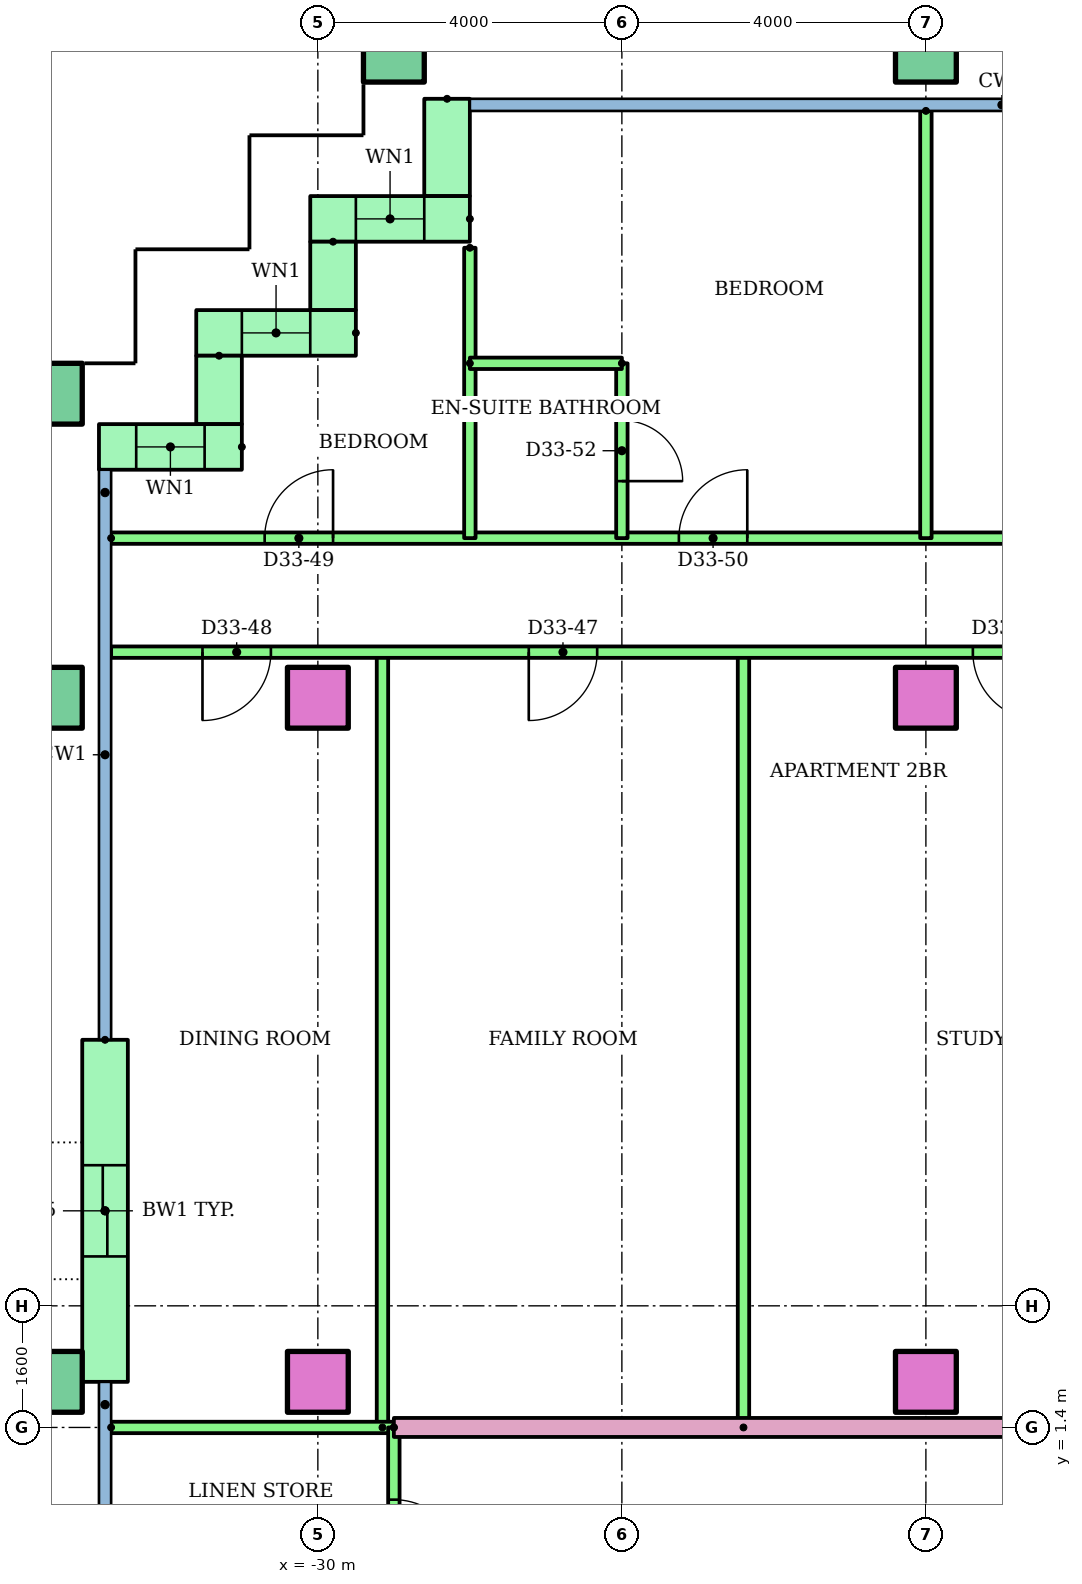
"""IFC4 building model, lengths in metres.
Left out: names, types, materials, properties, quantities, classifications, styles, units other than length and angle.
Written with IfcOpenShell. Run it as: python <this file> out.ifc"""

import sys

from ifc_helpers import new_model, si_unit, direction, frame, frame_2d, origin, origin_2d, place, context, subcontext, project, spatial, rectangle, hollow_rectangle, extrude, element, fill, save


model = new_model("IFC4")
c1 = context("Model", 3, precision=1e-05, world=origin(), true_north=direction((0.0, 1.0)))
c2 = subcontext(c1, "Body", "Model", "MODEL_VIEW")
j1 = project(units=[si_unit("LENGTHUNIT", "METRE"), si_unit("PLANEANGLEUNIT", "RADIAN")], contexts=[c1])
p1 = place(None, origin())
s1 = spatial("IfcSite", under=j1, at=p1, CompositionType="ELEMENT")
p2 = place(p1, origin())
s2 = spatial("IfcBuilding", under=s1, at=p2, CompositionType="ELEMENT")
p3 = place(p2, frame((0.0, 0.0, 129.4)))
s3 = spatial("IfcBuildingStorey", under=s2, at=p3, CompositionType="ELEMENT", Elevation=129.4)
p4 = place(p3, frame((-33.5, 2.0, 0.0)))
e1 = element("IfcColumn", 1, at=p4, inside=s3, PredefinedType="COLUMN", context=c2, shape_type="SweptSolid", body=[
    extrude(hollow_rectangle(XDim=0.8, YDim=0.8, WallThickness=0.04, at=origin_2d()), origin(), (0.0, 0.0, 1.0), 3.2),
])
for number, where in (
    (2, (-30.0, 2.0, 0.0)),
    (3, (-22.0, 2.0, 0.0)),
):
    element("IfcColumn", number, at=place(p3, frame(where)), inside=s3, PredefinedType="COLUMN", context=c2, shape_type="SweptSolid", body=[
        extrude(rectangle(XDim=0.8, YDim=0.8, at=origin_2d()), origin(), (0.0, 0.0, 1.0), 3.2),
    ])
p5 = place(p3, frame((-33.5, 11.0, 0.0)))
e4 = element("IfcColumn", 4, at=p5, inside=s3, PredefinedType="COLUMN", context=c2, shape_type="SweptSolid", body=[
    extrude(hollow_rectangle(XDim=0.8, YDim=0.8, WallThickness=0.04, at=origin_2d()), origin(), (0.0, 0.0, 1.0), 3.2),
])
for number, where in (
    (5, (-30.0, 11.0, 0.0)),
    (6, (-22.0, 11.0, 0.0)),
):
    element("IfcColumn", number, at=place(p3, frame(where)), inside=s3, PredefinedType="COLUMN", context=c2, shape_type="SweptSolid", body=[
        extrude(rectangle(XDim=0.8, YDim=0.8, at=origin_2d()), origin(), (0.0, 0.0, 1.0), 3.2),
    ])
for number, where in (
    (7, (-33.5, 15.0, 0.0)),
    (8, (-29.0, 19.5, 0.0)),
    (9, (-22.0, 19.5, 0.0)),
):
    element("IfcColumn", number, at=place(p3, frame(where)), inside=s3, PredefinedType="COLUMN", context=c2, shape_type="SweptSolid", body=[
        extrude(hollow_rectangle(XDim=0.8, YDim=0.8, WallThickness=0.04, at=origin_2d()), origin(), (0.0, 0.0, 1.0), 3.2),
    ])
p6 = place(p3, frame((-28.3, 18.88, 0.0), z_axis=(0.0, 0.0, 1.0), x_axis=(0.0, -1.0, 0.0)))
e10 = element("IfcWall", 10, at=p6, inside=s3, PredefinedType="STANDARD", context=c2, shape_type="SweptSolid", body=[
    extrude(rectangle(XDim=1.28, YDim=0.6, at=frame_2d((0.64, 0.0))), origin(), (0.0, 0.0, 1.0), 2.92),
])
p7 = place(p3, frame((-28.0, 17.3, 0.0), z_axis=(0.0, 0.0, 1.0), x_axis=(-1.0, 0.0, 0.0)))
e11 = element("IfcWall", 11, at=p7, inside=s3, PredefinedType="STANDARD", context=c2, shape_type="SweptSolid", body=[
    extrude(rectangle(XDim=2.1, YDim=0.6, at=frame_2d((1.05, 0.0))), origin(), (0.0, 0.0, 1.0), 2.92),
])
p8 = place(p7, frame((0.6, 0.0, 0.9)))
e12 = element("IfcOpeningElement", 12, at=p8, cuts=e11, PredefinedType="OPENING", context=c2, shape_type="SweptSolid", body=[
    extrude(rectangle(XDim=0.9, YDim=1.5, at=frame_2d((0.45, 0.75))), frame((0.0, 0.31, 0.0), z_axis=(0.0, -1.0, 0.0), x_axis=(1.0, 0.0, 0.0)), (0.0, 0.0, 1.0), 0.62),
])
p9 = place(p3, frame((-29.8, 17.0, 0.0), z_axis=(0.0, 0.0, 1.0), x_axis=(0.0, -1.0, 0.0)))
e13 = element("IfcWall", 13, at=p9, inside=s3, PredefinedType="STANDARD", context=c2, shape_type="SweptSolid", body=[
    extrude(rectangle(XDim=0.9, YDim=0.6, at=frame_2d((0.45, 0.0))), origin(), (0.0, 0.0, 1.0), 2.92),
])
p10 = place(p3, frame((-29.5, 15.8, 0.0), z_axis=(0.0, 0.0, 1.0), x_axis=(-1.0, 0.0, 0.0)))
e14 = element("IfcWall", 14, at=p10, inside=s3, PredefinedType="STANDARD", context=c2, shape_type="SweptSolid", body=[
    extrude(rectangle(XDim=2.1, YDim=0.6, at=frame_2d((1.05, 0.0))), origin(), (0.0, 0.0, 1.0), 2.92),
])
p11 = place(p10, frame((0.6, 0.0, 0.9)))
e15 = element("IfcOpeningElement", 15, at=p11, cuts=e14, PredefinedType="OPENING", context=c2, shape_type="SweptSolid", body=[
    extrude(rectangle(XDim=0.9, YDim=1.5, at=frame_2d((0.45, 0.75))), frame((0.0, 0.31, 0.0), z_axis=(0.0, -1.0, 0.0), x_axis=(1.0, 0.0, 0.0)), (0.0, 0.0, 1.0), 0.62),
])
p12 = place(p3, frame((-31.3, 15.5, 0.0), z_axis=(0.0, 0.0, 1.0), x_axis=(0.0, -1.0, 0.0)))
e16 = element("IfcWall", 16, at=p12, inside=s3, PredefinedType="STANDARD", context=c2, shape_type="SweptSolid", body=[
    extrude(rectangle(XDim=0.9, YDim=0.6, at=frame_2d((0.45, 0.0))), origin(), (0.0, 0.0, 1.0), 2.92),
])
p13 = place(p3, frame((-31.0, 14.3, 0.0), z_axis=(0.0, 0.0, 1.0), x_axis=(-1.0, 0.0, 0.0)))
e17 = element("IfcWall", 17, at=p13, inside=s3, PredefinedType="STANDARD", context=c2, shape_type="SweptSolid", body=[
    extrude(rectangle(XDim=1.88, YDim=0.6, at=frame_2d((0.94, 0.0))), origin(), (0.0, 0.0, 1.0), 2.92),
])
p14 = place(p13, frame((0.49, 0.0, 0.9)))
e18 = element("IfcOpeningElement", 18, at=p14, cuts=e17, PredefinedType="OPENING", context=c2, shape_type="SweptSolid", body=[
    extrude(rectangle(XDim=0.9, YDim=1.5, at=frame_2d((0.45, 0.75))), frame((0.0, 0.31, 0.0), z_axis=(0.0, -1.0, 0.0), x_axis=(1.0, 0.0, 0.0)), (0.0, 0.0, 1.0), 0.62),
])
p15 = place(p3, frame((-32.8, 6.5, 0.0), z_axis=(0.0, 0.0, 1.0), x_axis=(0.0, -1.0, 0.0)))
e19 = element("IfcWall", 19, at=p15, inside=s3, PredefinedType="STANDARD", context=c2, shape_type="SweptSolid", body=[
    extrude(rectangle(XDim=4.5, YDim=0.6, at=frame_2d((2.25, 0.0))), origin(), (0.0, 0.0, 1.0), 2.92),
])
p16 = place(p15, frame((1.65, 0.0, 0.0)))
e20 = element("IfcOpeningElement", 20, at=p16, cuts=e19, PredefinedType="OPENING", context=c2, shape_type="SweptSolid", body=[
    extrude(rectangle(XDim=1.2, YDim=2.1, at=frame_2d((0.6, 1.05))), frame((0.0, 0.31, 0.0), z_axis=(0.0, -1.0, 0.0), x_axis=(1.0, 0.0, 0.0)), (0.0, 0.0, 1.0), 0.62),
])
for number, where, z_axis, x_axis in (
    (21, (-24.4, 1.4, 0.0), (0.0, 0.0, 1.0), (0.0, 1.0, 0.0)),
    (22, (-29.15, 1.4, 0.0), (0.0, 0.0, 1.0), (0.0, 1.0, 0.0)),
):
    element("IfcWall", number, at=place(p3, frame(where, z_axis=z_axis, x_axis=x_axis)), inside=s3, PredefinedType="PARTITIONING", context=c2, shape_type="SweptSolid", body=[
        extrude(rectangle(XDim=10.2, YDim=0.15, at=frame_2d((5.1, 0.0))), origin(), (0.0, 0.0, 1.0), 2.4),
    ])
p17 = place(p3, frame((-16.0, 11.6, 0.0), z_axis=(0.0, 0.0, 1.0), x_axis=(-1.0, 0.0, 0.0)))
e23 = element("IfcWall", 23, at=p17, inside=s3, PredefinedType="PARTITIONING", context=c2, shape_type="SweptSolid", body=[
    extrude(rectangle(XDim=16.72, YDim=0.15, at=frame_2d((8.36, 0.0))), origin(), (0.0, 0.0, 1.0), 2.4),
])
p18 = place(p17, frame((4.482, 0.0, 0.0)))
e24 = element("IfcOpeningElement", 24, at=p18, cuts=e23, PredefinedType="OPENING", context=c2, shape_type="SweptSolid", body=[
    extrude(rectangle(XDim=0.9, YDim=2.1, at=frame_2d((0.45, 1.05))), frame((0.0, 0.085, 0.0), z_axis=(0.0, -1.0, 0.0), x_axis=(1.0, 0.0, 0.0)), (0.0, 0.0, 1.0), 0.17),
])
p19 = place(p17, frame((10.325, 0.0, 0.0)))
e25 = element("IfcOpeningElement", 25, at=p19, cuts=e23, PredefinedType="OPENING", context=c2, shape_type="SweptSolid", body=[
    extrude(rectangle(XDim=0.9, YDim=2.1, at=frame_2d((0.45, 1.05))), frame((0.0, 0.085, 0.0), z_axis=(0.0, -1.0, 0.0), x_axis=(1.0, 0.0, 0.0)), (0.0, 0.0, 1.0), 0.17),
])
p20 = place(p17, frame((14.618, 0.0, 0.0)))
e26 = element("IfcOpeningElement", 26, at=p20, cuts=e23, PredefinedType="OPENING", context=c2, shape_type="SweptSolid", body=[
    extrude(rectangle(XDim=0.9, YDim=2.1, at=frame_2d((0.45, 1.05))), frame((0.0, 0.085, 0.0), z_axis=(0.0, -1.0, 0.0), x_axis=(1.0, 0.0, 0.0)), (0.0, 0.0, 1.0), 0.17),
])
p21 = place(p3, frame((-32.72, 13.1, 0.0)))
e27 = element("IfcWall", 27, at=p21, inside=s3, PredefinedType="PARTITIONING", context=c2, shape_type="SweptSolid", body=[
    extrude(rectangle(XDim=18.72, YDim=0.15, at=frame_2d((9.36, 0.0))), origin(), (0.0, 0.0, 1.0), 2.4),
])
p22 = place(p21, frame((2.02, 0.0, 0.0)))
e28 = element("IfcOpeningElement", 28, at=p22, cuts=e27, PredefinedType="OPENING", context=c2, shape_type="SweptSolid", body=[
    extrude(rectangle(XDim=0.9, YDim=2.1, at=frame_2d((0.45, 1.05))), frame((0.0, 0.085, 0.0), z_axis=(0.0, -1.0, 0.0), x_axis=(1.0, 0.0, 0.0)), (0.0, 0.0, 1.0), 0.17),
])
p23 = place(p21, frame((7.47, 0.0, 0.0)))
e29 = element("IfcOpeningElement", 29, at=p23, cuts=e27, PredefinedType="OPENING", context=c2, shape_type="SweptSolid", body=[
    extrude(rectangle(XDim=0.9, YDim=2.1, at=frame_2d((0.45, 1.05))), frame((0.0, 0.085, 0.0), z_axis=(0.0, -1.0, 0.0), x_axis=(1.0, 0.0, 0.0)), (0.0, 0.0, 1.0), 0.17),
])
p24 = place(p21, frame((14.22, 0.0, 0.0)))
e30 = element("IfcOpeningElement", 30, at=p24, cuts=e27, PredefinedType="OPENING", context=c2, shape_type="SweptSolid", body=[
    extrude(rectangle(XDim=1.0, YDim=2.1, at=frame_2d((0.5, 1.05))), frame((0.0, 0.085, 0.0), z_axis=(0.0, -1.0, 0.0), x_axis=(1.0, 0.0, 0.0)), (0.0, 0.0, 1.0), 0.17),
])
p25 = place(p3, frame((-28.0, 16.92, 0.0), z_axis=(0.0, 0.0, 1.0), x_axis=(0.0, -1.0, 0.0)))
e31 = element("IfcWall", 31, at=p25, inside=s3, PredefinedType="PARTITIONING", context=c2, shape_type="SweptSolid", body=[
    extrude(rectangle(XDim=3.82, YDim=0.15, at=frame_2d((1.91, 0.0))), origin(), (0.0, 0.0, 1.0), 2.4),
])
p26 = place(p3, frame((-22.0, 18.721, 0.0), z_axis=(0.0, 0.0, 1.0), x_axis=(0.0, -1.0, 0.0)))
e32 = element("IfcWall", 32, at=p26, inside=s3, PredefinedType="PARTITIONING", context=c2, shape_type="SweptSolid", body=[
    extrude(rectangle(XDim=5.621, YDim=0.15, at=frame_2d((2.811, 0.0))), origin(), (0.0, 0.0, 1.0), 2.4),
])
p27 = place(p3, frame((-26.0, 15.4, 0.0), z_axis=(0.0, 0.0, 1.0), x_axis=(0.0, -1.0, 0.0)))
e33 = element("IfcWall", 33, at=p27, inside=s3, PredefinedType="PARTITIONING", context=c2, shape_type="SweptSolid", body=[
    extrude(rectangle(XDim=2.3, YDim=0.15, at=frame_2d((1.15, 0.0))), origin(), (0.0, 0.0, 1.0), 2.4),
])
p28 = place(p27, frame((0.75, 0.0, 0.0)))
e34 = element("IfcOpeningElement", 34, at=p28, cuts=e33, PredefinedType="OPENING", context=c2, shape_type="SweptSolid", body=[
    extrude(rectangle(XDim=0.8, YDim=2.1, at=frame_2d((0.4, 1.05))), frame((0.0, 0.085, 0.0), z_axis=(0.0, -1.0, 0.0), x_axis=(1.0, 0.0, 0.0)), (0.0, 0.0, 1.0), 0.17),
])
p29 = place(p3, frame((-28.0, 15.4, 0.0)))
e35 = element("IfcWall", 35, at=p29, inside=s3, PredefinedType="PARTITIONING", context=c2, shape_type="SweptSolid", body=[
    extrude(rectangle(XDim=2.0, YDim=0.15, at=frame_2d((1.0, 0.0))), origin(), (0.0, 0.0, 1.0), 2.4),
])
p30 = place(p3, frame((-29.0, 1.4, 0.0)))
e36 = element("IfcWall", 36, at=p30, inside=s3, PredefinedType="PARTITIONING", context=c2, shape_type="SweptSolid", body=[
    extrude(rectangle(XDim=15.0, YDim=0.25, at=frame_2d((7.5, 0.0))), origin(), (0.0, 0.0, 1.0), 2.4),
])
p31 = place(p30, frame((13.5, 0.0, 0.0)))
e37 = element("IfcOpeningElement", 37, at=p31, cuts=e36, PredefinedType="OPENING", context=c2, shape_type="SweptSolid", body=[
    extrude(rectangle(XDim=1.0, YDim=2.1, at=frame_2d((0.5, 1.05))), frame((0.0, 0.135, 0.0), z_axis=(0.0, -1.0, 0.0), x_axis=(1.0, 0.0, 0.0)), (0.0, 0.0, 1.0), 0.27),
])
p32 = place(p3, frame((-32.72, 1.4, 0.0)))
e38 = element("IfcWall", 38, at=p32, inside=s3, PredefinedType="PARTITIONING", context=c2, shape_type="SweptSolid", body=[
    extrude(rectangle(XDim=3.72, YDim=0.15, at=frame_2d((1.86, 0.0))), origin(), (0.0, 0.0, 1.0), 2.4),
])
p33 = place(p3, frame((-29.0, 1.4, 0.0), z_axis=(0.0, 0.0, 1.0), x_axis=(0.0, -1.0, 0.0)))
e39 = element("IfcWall", 39, at=p33, inside=s3, PredefinedType="PARTITIONING", context=c2, shape_type="SweptSolid", body=[
    extrude(rectangle(XDim=2.8, YDim=0.15, at=frame_2d((1.4, 0.0))), origin(), (0.0, 0.0, 1.0), 2.4),
])
p34 = place(p33, frame((0.95, 0.0, 0.0)))
e40 = element("IfcOpeningElement", 40, at=p34, cuts=e39, PredefinedType="OPENING", context=c2, shape_type="SweptSolid", body=[
    extrude(rectangle(XDim=0.9, YDim=2.1, at=frame_2d((0.45, 1.05))), frame((0.0, 0.085, 0.0), z_axis=(0.0, -1.0, 0.0), x_axis=(1.0, 0.0, 0.0)), (0.0, 0.0, 1.0), 0.17),
])
p35 = place(p8, origin())
e41 = element("IfcWindow", 41, at=p35, inside=s3, PartitioningType="SINGLE_PANEL", PredefinedType="WINDOW", context=c2, shape_type="SweptSolid", body=[
    extrude(rectangle(XDim=0.9, YDim=1.5, at=frame_2d((0.45, 0.75))), frame((0.0, 0.03, 0.0), z_axis=(0.0, -1.0, 0.0), x_axis=(1.0, 0.0, 0.0)), (0.0, 0.0, 1.0), 0.06),
])
fill(e12, e41)
p36 = place(p11, origin())
e42 = element("IfcWindow", 42, at=p36, inside=s3, PartitioningType="SINGLE_PANEL", PredefinedType="WINDOW", context=c2, shape_type="SweptSolid", body=[
    extrude(rectangle(XDim=0.9, YDim=1.5, at=frame_2d((0.45, 0.75))), frame((0.0, 0.03, 0.0), z_axis=(0.0, -1.0, 0.0), x_axis=(1.0, 0.0, 0.0)), (0.0, 0.0, 1.0), 0.06),
])
fill(e15, e42)
p37 = place(p14, origin())
e43 = element("IfcWindow", 43, at=p37, inside=s3, PartitioningType="SINGLE_PANEL", PredefinedType="WINDOW", context=c2, shape_type="SweptSolid", body=[
    extrude(rectangle(XDim=0.9, YDim=1.5, at=frame_2d((0.45, 0.75))), frame((0.0, 0.03, 0.0), z_axis=(0.0, -1.0, 0.0), x_axis=(1.0, 0.0, 0.0)), (0.0, 0.0, 1.0), 0.06),
])
fill(e18, e43)
p38 = place(p18, origin())
e44 = element("IfcDoor", 44, at=p38, inside=s3, OperationType="SINGLE_SWING_LEFT", PredefinedType="DOOR", context=c2, shape_type="SweptSolid", body=[
    extrude(rectangle(XDim=0.9, YDim=2.1, at=frame_2d((0.45, 1.05))), frame((0.0, 0.025, 0.0), z_axis=(0.0, -1.0, 0.0), x_axis=(1.0, 0.0, 0.0)), (0.0, 0.0, 1.0), 0.05),
])
fill(e24, e44)
p39 = place(p19, origin())
e45 = element("IfcDoor", 45, at=p39, inside=s3, OperationType="SINGLE_SWING_RIGHT", PredefinedType="DOOR", context=c2, shape_type="SweptSolid", body=[
    extrude(rectangle(XDim=0.9, YDim=2.1, at=frame_2d((0.45, 1.05))), frame((0.0, 0.025, 0.0), z_axis=(0.0, -1.0, 0.0), x_axis=(1.0, 0.0, 0.0)), (0.0, 0.0, 1.0), 0.05),
])
fill(e25, e45)
p40 = place(p20, origin())
e46 = element("IfcDoor", 46, at=p40, inside=s3, OperationType="SINGLE_SWING_RIGHT", PredefinedType="DOOR", context=c2, shape_type="SweptSolid", body=[
    extrude(rectangle(XDim=0.9, YDim=2.1, at=frame_2d((0.45, 1.05))), frame((0.0, 0.025, 0.0), z_axis=(0.0, -1.0, 0.0), x_axis=(1.0, 0.0, 0.0)), (0.0, 0.0, 1.0), 0.05),
])
fill(e26, e46)
p41 = place(p22, origin())
e47 = element("IfcDoor", 47, at=p41, inside=s3, OperationType="SINGLE_SWING_RIGHT", PredefinedType="DOOR", context=c2, shape_type="SweptSolid", body=[
    extrude(rectangle(XDim=0.9, YDim=2.1, at=frame_2d((0.45, 1.05))), frame((0.0, 0.025, 0.0), z_axis=(0.0, -1.0, 0.0), x_axis=(1.0, 0.0, 0.0)), (0.0, 0.0, 1.0), 0.05),
])
fill(e28, e47)
p42 = place(p23, origin())
e48 = element("IfcDoor", 48, at=p42, inside=s3, OperationType="SINGLE_SWING_RIGHT", PredefinedType="DOOR", context=c2, shape_type="SweptSolid", body=[
    extrude(rectangle(XDim=0.9, YDim=2.1, at=frame_2d((0.45, 1.05))), frame((0.0, 0.025, 0.0), z_axis=(0.0, -1.0, 0.0), x_axis=(1.0, 0.0, 0.0)), (0.0, 0.0, 1.0), 0.05),
])
fill(e29, e48)
p43 = place(p28, origin())
e49 = element("IfcDoor", 49, at=p43, inside=s3, OperationType="SINGLE_SWING_RIGHT", PredefinedType="DOOR", context=c2, shape_type="SweptSolid", body=[
    extrude(rectangle(XDim=0.8, YDim=2.1, at=frame_2d((0.4, 1.05))), frame((0.0, 0.025, 0.0), z_axis=(0.0, -1.0, 0.0), x_axis=(1.0, 0.0, 0.0)), (0.0, 0.0, 1.0), 0.05),
])
fill(e34, e49)
p44 = place(p34, origin())
e50 = element("IfcDoor", 50, at=p44, inside=s3, OperationType="SINGLE_SWING_RIGHT", PredefinedType="DOOR", context=c2, shape_type="SweptSolid", body=[
    extrude(rectangle(XDim=0.9, YDim=2.1, at=frame_2d((0.45, 1.05))), frame((0.0, 0.025, 0.0), z_axis=(0.0, -1.0, 0.0), x_axis=(1.0, 0.0, 0.0)), (0.0, 0.0, 1.0), 0.05),
])
fill(e40, e50)
p45 = place(p16, origin())
e51 = element("IfcDoor", 51, at=p45, inside=s3, OperationType="SLIDING_TO_LEFT", PredefinedType="DOOR", context=c2, shape_type="SweptSolid", body=[
    extrude(rectangle(XDim=1.2, YDim=2.1, at=frame_2d((0.6, 1.05))), frame((0.0, 0.025, 0.0), z_axis=(0.0, -1.0, 0.0), x_axis=(1.0, 0.0, 0.0)), (0.0, 0.0, 1.0), 0.05),
])
fill(e20, e51)
save(model, sys.argv[1])
